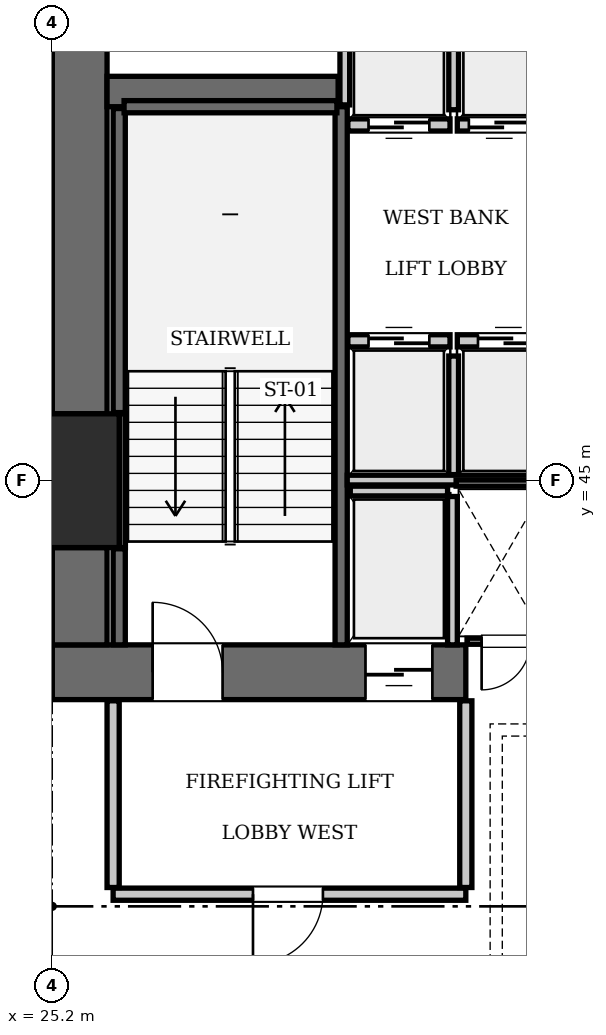
"""IFC4 building model, lengths in metres.
Left out: names, types, materials, properties, quantities, classifications, styles, units other than length and angle.
Written with IfcOpenShell. Run it as: python <this file> out.ifc"""

import sys

from ifc_helpers import new_model, si_unit, direction, frame, frame_2d, origin, origin_2d, place, context, subcontext, project, spatial, rectangle, extrude, element, fill, save


model = new_model("IFC4")
c1 = context("Model", 3, precision=1e-05, world=origin(), true_north=direction((0.0, 1.0)))
c2 = subcontext(c1, "Body", "Model", "MODEL_VIEW")
j1 = project(units=[si_unit("LENGTHUNIT", "METRE"), si_unit("PLANEANGLEUNIT", "RADIAN")], contexts=[c1])
p1 = place(None, origin())
s1 = spatial("IfcSite", under=j1, at=p1, CompositionType="ELEMENT")
p2 = place(p1, origin())
s2 = spatial("IfcBuilding", under=s1, at=p2, CompositionType="ELEMENT")
p3 = place(p2, frame((0.0, 0.0, 26.95)))
s3 = spatial("IfcBuildingStorey", under=s2, at=p3, CompositionType="ELEMENT", Elevation=26.95)
p4 = place(p3, frame((25.2, 45.0, 0.0), z_axis=(0.0, 0.0, 1.0), x_axis=(1.0, 0.0, 0.0)))
e1 = element("IfcColumn", 1, at=p4, inside=s3, PredefinedType="COLUMN", context=c2, shape_type="SweptSolid", body=[
    extrude(rectangle(XDim=2.2, YDim=2.2, at=origin_2d()), origin(), (0.0, 0.0, 1.0), 3.85),
])
p5 = place(p3, frame((25.2, 41.85, 0.0), z_axis=(0.0, 0.0, 1.0), x_axis=(1.0, 0.0, 0.0)))
e2 = element("IfcWall", 2, at=p5, inside=s3, PredefinedType="SHEAR", context=c2, shape_type="SweptSolid", body=[
    extrude(rectangle(XDim=6.8, YDim=0.9, at=frame_2d((3.4, 0.0))), origin(), (0.0, 0.0, 1.0), 3.85),
])
p6 = place(p5, frame((1.65, 0.0, 0.0)))
e3 = element("IfcOpeningElement", 3, at=p6, cuts=e2, PredefinedType="OPENING", context=c2, shape_type="SweptSolid", body=[
    extrude(rectangle(XDim=1.15, YDim=2.15, at=frame_2d((0.575, 1.075))), frame((0.0, 0.46, 0.0), z_axis=(0.0, -1.0, 0.0), x_axis=(1.0, 0.0, 0.0)), (0.0, 0.0, 1.0), 0.92),
])
p7 = place(p5, frame((5.15, 0.0, 0.0)))
e4 = element("IfcOpeningElement", 4, at=p7, cuts=e2, PredefinedType="OPENING", context=c2, shape_type="SweptSolid", body=[
    extrude(rectangle(XDim=1.1, YDim=2.2, at=frame_2d((0.55, 1.1))), frame((0.0, 0.46, 0.0), z_axis=(0.0, -1.0, 0.0), x_axis=(1.0, 0.0, 0.0)), (0.0, 0.0, 1.0), 0.92),
])
p8 = place(p3, frame((25.65, 42.3, 0.0), z_axis=(0.0, 0.0, 1.0), x_axis=(0.0, 1.0, 0.0)))
e5 = element("IfcWall", 5, at=p8, inside=s3, PredefinedType="SHEAR", context=c2, shape_type="SweptSolid", body=[
    extrude(rectangle(XDim=1.6, YDim=0.9, at=frame_2d((0.8, 0.0))), origin(), (0.0, 0.0, 1.0), 3.85),
])
p9 = place(p3, frame((25.65, 46.1, 0.0), z_axis=(0.0, 0.0, 1.0), x_axis=(0.0, 1.0, 0.0)))
e6 = element("IfcWall", 6, at=p9, inside=s3, PredefinedType="SHEAR", context=c2, shape_type="SweptSolid", body=[
    extrude(rectangle(XDim=7.0, YDim=0.9, at=frame_2d((3.5, 0.0))), origin(), (0.0, 0.0, 1.0), 3.85),
])
p10 = place(p3, frame((26.1, 51.4, 0.0), z_axis=(0.0, 0.0, 1.0), x_axis=(1.0, 0.0, 0.0)))
e7 = element("IfcWall", 7, at=p10, inside=s3, PredefinedType="SHEAR", context=c2, shape_type="SweptSolid", body=[
    extrude(rectangle(XDim=3.8, YDim=0.5, at=frame_2d((1.9, 0.0))), origin(), (0.0, 0.0, 1.0), 3.85),
])
p11 = place(p3, frame((29.95, 42.3, 0.0), z_axis=(0.0, 0.0, 1.0), x_axis=(0.0, 1.0, 0.0)))
e8 = element("IfcWall", 8, at=p11, inside=s3, PredefinedType="SOLIDWALL", context=c2, shape_type="SweptSolid", body=[
    extrude(rectangle(XDim=8.85, YDim=0.2, at=frame_2d((4.425, 0.0))), origin(), (0.0, 0.0, 1.0), 3.61),
])
p12 = place(p3, frame((26.3, 42.3, 0.0), z_axis=(0.0, 0.0, 1.0), x_axis=(0.0, 1.0, 0.0)))
e9 = element("IfcWall", 9, at=p12, inside=s3, PredefinedType="SOLIDWALL", context=c2, shape_type="SweptSolid", body=[
    extrude(rectangle(XDim=1.58, YDim=0.2, at=frame_2d((0.79, 0.0))), origin(), (0.0, 0.0, 1.0), 3.61),
])
p13 = place(p3, frame((26.3, 46.12, 0.0), z_axis=(0.0, 0.0, 1.0), x_axis=(0.0, 1.0, 0.0)))
e10 = element("IfcWall", 10, at=p13, inside=s3, PredefinedType="SOLIDWALL", context=c2, shape_type="SweptSolid", body=[
    extrude(rectangle(XDim=5.0, YDim=0.2, at=frame_2d((2.5, 0.0))), origin(), (0.0, 0.0, 1.0), 3.61),
])
p14 = place(p3, frame((26.38, 51.15, 0.0), z_axis=(0.0, 0.0, 1.0), x_axis=(1.0, 0.0, 0.0)))
e11 = element("IfcWall", 11, at=p14, inside=s3, PredefinedType="SOLIDWALL", context=c2, shape_type="SweptSolid", body=[
    extrude(rectangle(XDim=3.5, YDim=0.2, at=frame_2d((1.75, 0.0))), origin(), (0.0, 0.0, 1.0), 3.61),
])
p15 = place(p3, frame((26.352, 43.9, 0.0), z_axis=(0.0, 0.0, 1.0), x_axis=(0.0, 1.0, 0.0)))
e12 = element("IfcWall", 12, at=p15, inside=s3, PredefinedType="SOLIDWALL", context=c2, shape_type="SweptSolid", body=[
    extrude(rectangle(XDim=2.2, YDim=0.1, at=frame_2d((1.1, 0.0))), origin(), (0.0, 0.0, 1.0), 3.61),
])
p16 = place(p3, frame((30.06, 47.3, 0.0), z_axis=(0.0, 0.0, 1.0), x_axis=(1.0, 0.0, 0.0)))
e13 = element("IfcWall", 13, at=p16, inside=s3, PredefinedType="SOLIDWALL", context=c2, shape_type="SweptSolid", body=[
    extrude(rectangle(XDim=1.68, YDim=0.2, at=frame_2d((0.84, 0.0))), origin(), (0.0, 0.0, 1.0), 3.61),
])
p17 = place(p16, frame((0.34, 0.0, 0.0)))
e14 = element("IfcOpeningElement", 14, at=p17, cuts=e13, PredefinedType="OPENING", context=c2, shape_type="SweptSolid", body=[
    extrude(rectangle(XDim=1.0, YDim=2.15, at=frame_2d((0.5, 1.075))), frame((0.0, 0.11, 0.0), z_axis=(0.0, -1.0, 0.0), x_axis=(1.0, 0.0, 0.0)), (0.0, 0.0, 1.0), 0.22),
])
p18 = place(p3, frame((31.86, 47.3, 0.0), z_axis=(0.0, 0.0, 1.0), x_axis=(1.0, 0.0, 0.0)))
e15 = element("IfcWall", 15, at=p18, inside=s3, PredefinedType="SOLIDWALL", context=c2, shape_type="SweptSolid", body=[
    extrude(rectangle(XDim=1.68, YDim=0.2, at=frame_2d((0.84, 0.0))), origin(), (0.0, 0.0, 1.0), 3.61),
])
p19 = place(p18, frame((0.34, 0.0, 0.0)))
e16 = element("IfcOpeningElement", 16, at=p19, cuts=e15, PredefinedType="OPENING", context=c2, shape_type="SweptSolid", body=[
    extrude(rectangle(XDim=1.0, YDim=2.15, at=frame_2d((0.5, 1.075))), frame((0.0, 0.11, 0.0), z_axis=(0.0, -1.0, 0.0), x_axis=(1.0, 0.0, 0.0)), (0.0, 0.0, 1.0), 0.22),
])
p20 = place(p3, frame((30.06, 50.85, 0.0), z_axis=(0.0, 0.0, 1.0), x_axis=(1.0, 0.0, 0.0)))
e17 = element("IfcWall", 17, at=p20, inside=s3, PredefinedType="SOLIDWALL", context=c2, shape_type="SweptSolid", body=[
    extrude(rectangle(XDim=1.68, YDim=0.2, at=frame_2d((0.84, 0.0))), origin(), (0.0, 0.0, 1.0), 3.61),
])
p21 = place(p20, frame((0.34, 0.0, 0.0)))
e18 = element("IfcOpeningElement", 18, at=p21, cuts=e17, PredefinedType="OPENING", context=c2, shape_type="SweptSolid", body=[
    extrude(rectangle(XDim=1.0, YDim=2.15, at=frame_2d((0.5, 1.075))), frame((0.0, 0.11, 0.0), z_axis=(0.0, -1.0, 0.0), x_axis=(1.0, 0.0, 0.0)), (0.0, 0.0, 1.0), 0.22),
])
p22 = place(p3, frame((31.86, 50.85, 0.0), z_axis=(0.0, 0.0, 1.0), x_axis=(1.0, 0.0, 0.0)))
e19 = element("IfcWall", 19, at=p22, inside=s3, PredefinedType="SOLIDWALL", context=c2, shape_type="SweptSolid", body=[
    extrude(rectangle(XDim=1.38, YDim=0.2, at=frame_2d((0.69, 0.0))), origin(), (0.0, 0.0, 1.0), 3.61),
])
p23 = place(p22, frame((0.19, 0.0, 0.0)))
e20 = element("IfcOpeningElement", 20, at=p23, cuts=e19, PredefinedType="OPENING", context=c2, shape_type="SweptSolid", body=[
    extrude(rectangle(XDim=1.0, YDim=2.15, at=frame_2d((0.5, 1.075))), frame((0.0, 0.11, 0.0), z_axis=(0.0, -1.0, 0.0), x_axis=(1.0, 0.0, 0.0)), (0.0, 0.0, 1.0), 0.22),
])
p24 = place(p3, frame((30.1, 44.83, 0.0), z_axis=(0.0, 0.0, 1.0), x_axis=(1.0, 0.0, 0.0)))
e21 = element("IfcWall", 21, at=p24, inside=s3, PredefinedType="SOLIDWALL", context=c2, shape_type="SweptSolid", body=[
    extrude(rectangle(XDim=1.6, YDim=0.16, at=frame_2d((0.8, 0.0))), origin(), (0.0, 0.0, 1.0), 3.61),
])
p25 = place(p3, frame((31.78, 42.3, 0.0), z_axis=(0.0, 0.0, 1.0), x_axis=(0.0, 1.0, 0.0)))
e22 = element("IfcWall", 22, at=p25, inside=s3, PredefinedType="SOLIDWALL", context=c2, shape_type="SweptSolid", body=[
    extrude(rectangle(XDim=2.44, YDim=0.16, at=frame_2d((1.22, 0.0))), origin(), (0.0, 0.0, 1.0), 3.61),
])
p26 = place(p3, frame((31.8, 45.1, 0.0), z_axis=(0.0, 0.0, 1.0), x_axis=(0.0, 1.0, 0.0)))
e23 = element("IfcWall", 23, at=p26, inside=s3, PredefinedType="SOLIDWALL", context=c2, shape_type="SweptSolid", body=[
    extrude(rectangle(XDim=1.95, YDim=0.16, at=frame_2d((0.975, 0.0))), origin(), (0.0, 0.0, 1.0), 3.61),
])
p27 = place(p3, frame((30.05, 45.01, 0.0), z_axis=(0.0, 0.0, 1.0), x_axis=(1.0, 0.0, 0.0)))
e24 = element("IfcWall", 24, at=p27, inside=s3, PredefinedType="SOLIDWALL", context=c2, shape_type="SweptSolid", body=[
    extrude(rectangle(XDim=3.45, YDim=0.16, at=frame_2d((1.725, 0.0))), origin(), (0.0, 0.0, 1.0), 3.61),
])
p28 = place(p3, frame((30.01, 51.18, 0.0), z_axis=(0.0, 0.0, 1.0), x_axis=(0.0, 1.0, 0.0)))
e25 = element("IfcWall", 25, at=p28, inside=s3, PredefinedType="SOLIDWALL", context=c2, shape_type="SweptSolid", body=[
    extrude(rectangle(XDim=1.92, YDim=0.16, at=frame_2d((0.96, 0.0))), origin(), (0.0, 0.0, 1.0), 3.61),
])
p29 = place(p3, frame((31.8, 51.1, 0.0), z_axis=(0.0, 0.0, 1.0), x_axis=(0.0, 1.0, 0.0)))
e26 = element("IfcWall", 26, at=p29, inside=s3, PredefinedType="SOLIDWALL", context=c2, shape_type="SweptSolid", body=[
    extrude(rectangle(XDim=2.0, YDim=0.16, at=frame_2d((1.0, 0.0))), origin(), (0.0, 0.0, 1.0), 3.61),
])
p30 = place(p3, frame((26.2, 38.2, 0.0), z_axis=(0.0, 0.0, 1.0), x_axis=(1.0, 0.0, 0.0)))
e27 = element("IfcWall", 27, at=p30, inside=s3, PredefinedType="PARTITIONING", context=c2, shape_type="SweptSolid", body=[
    extrude(rectangle(XDim=5.8, YDim=0.2, at=frame_2d((2.9, 0.0))), origin(), (0.0, 0.0, 1.0), 3.61),
])
p31 = place(p30, frame((2.3, 0.0, 0.0)))
e28 = element("IfcOpeningElement", 28, at=p31, cuts=e27, PredefinedType="OPENING", context=c2, shape_type="SweptSolid", body=[
    extrude(rectangle(XDim=1.15, YDim=2.15, at=frame_2d((0.575, 1.075))), frame((0.0, 0.11, 0.0), z_axis=(0.0, -1.0, 0.0), x_axis=(1.0, 0.0, 0.0)), (0.0, 0.0, 1.0), 0.22),
])
for number, where, z_axis, x_axis in (
    (29, (26.2, 38.31, 0.0), (0.0, 0.0, 1.0), (0.0, 1.0, 0.0)),
    (30, (32.0, 38.31, 0.0), (0.0, 0.0, 1.0), (0.0, 1.0, 0.0)),
):
    element("IfcWall", number, at=place(p3, frame(where, z_axis=z_axis, x_axis=x_axis)), inside=s3, PredefinedType="PARTITIONING", context=c2, shape_type="SweptSolid", body=[
        extrude(rectangle(XDim=3.07, YDim=0.2, at=frame_2d((1.535, 0.0))), origin(), (0.0, 0.0, 1.0), 3.61),
    ])
p32 = place(p3, frame((32.02, 42.36, 0.0), z_axis=(0.0, 0.0, 1.0), x_axis=(1.0, 0.0, 0.0)))
e31 = element("IfcWall", 31, at=p32, inside=s3, PredefinedType="PARTITIONING", context=c2, shape_type="SweptSolid", body=[
    extrude(rectangle(XDim=1.32, YDim=0.1, at=frame_2d((0.66, 0.0))), origin(), (0.0, 0.0, 1.0), 3.61),
])
p33 = place(p32, frame((0.24, 0.0, 0.0)))
e32 = element("IfcOpeningElement", 32, at=p33, cuts=e31, PredefinedType="OPENING", context=c2, shape_type="SweptSolid", body=[
    extrude(rectangle(XDim=0.8, YDim=2.05, at=frame_2d((0.4, 1.025))), frame((0.0, 0.06, 0.0), z_axis=(0.0, -1.0, 0.0), x_axis=(1.0, 0.0, 0.0)), (0.0, 0.0, 1.0), 0.12),
])
p34 = place(p3, frame((31.84, 44.96, 0.0), z_axis=(0.0, 0.0, 1.0), x_axis=(1.0, 0.0, 0.0)))
e33 = element("IfcWall", 33, at=p34, inside=s3, PredefinedType="PARTITIONING", context=c2, shape_type="SweptSolid", body=[
    extrude(rectangle(XDim=1.48, YDim=0.1, at=frame_2d((0.74, 0.0))), origin(), (0.0, 0.0, 1.0), 3.61),
])
p35 = place(p6, origin())
e34 = element("IfcDoor", 34, at=p35, inside=s3, OperationType="SINGLE_SWING_LEFT", PredefinedType="DOOR", context=c2, shape_type="SweptSolid", body=[
    extrude(rectangle(XDim=1.15, YDim=2.15, at=frame_2d((0.575, 1.075))), frame((0.0, 0.025, 0.0), z_axis=(0.0, -1.0, 0.0), x_axis=(1.0, 0.0, 0.0)), (0.0, 0.0, 1.0), 0.05),
])
fill(e3, e34)
p36 = place(p17, origin())
e35 = element("IfcDoor", 35, at=p36, inside=s3, OperationType="SLIDING_TO_LEFT", PredefinedType="DOOR", context=c2, shape_type="SweptSolid", body=[
    extrude(rectangle(XDim=1.0, YDim=2.15, at=frame_2d((0.5, 1.075))), frame((0.0, 0.025, 0.0), z_axis=(0.0, -1.0, 0.0), x_axis=(1.0, 0.0, 0.0)), (0.0, 0.0, 1.0), 0.05),
])
fill(e14, e35)
p37 = place(p19, origin())
e36 = element("IfcDoor", 36, at=p37, inside=s3, OperationType="SLIDING_TO_LEFT", PredefinedType="DOOR", context=c2, shape_type="SweptSolid", body=[
    extrude(rectangle(XDim=1.0, YDim=2.15, at=frame_2d((0.5, 1.075))), frame((0.0, 0.025, 0.0), z_axis=(0.0, -1.0, 0.0), x_axis=(1.0, 0.0, 0.0)), (0.0, 0.0, 1.0), 0.05),
])
fill(e16, e36)
p38 = place(p21, frame((1.0, 0.0, 0.0), z_axis=(0.0, 0.0, 1.0), x_axis=(-1.0, 0.0, 0.0)))
e37 = element("IfcDoor", 37, at=p38, inside=s3, OperationType="SLIDING_TO_LEFT", PredefinedType="DOOR", context=c2, shape_type="SweptSolid", body=[
    extrude(rectangle(XDim=1.0, YDim=2.15, at=frame_2d((0.5, 1.075))), frame((0.0, 0.025, 0.0), z_axis=(0.0, -1.0, 0.0), x_axis=(1.0, 0.0, 0.0)), (0.0, 0.0, 1.0), 0.05),
])
fill(e18, e37)
p39 = place(p23, frame((1.0, 0.0, 0.0), z_axis=(0.0, 0.0, 1.0), x_axis=(-1.0, 0.0, 0.0)))
e38 = element("IfcDoor", 38, at=p39, inside=s3, OperationType="SLIDING_TO_LEFT", PredefinedType="DOOR", context=c2, shape_type="SweptSolid", body=[
    extrude(rectangle(XDim=1.0, YDim=2.15, at=frame_2d((0.5, 1.075))), frame((0.0, 0.025, 0.0), z_axis=(0.0, -1.0, 0.0), x_axis=(1.0, 0.0, 0.0)), (0.0, 0.0, 1.0), 0.05),
])
fill(e20, e38)
p40 = place(p7, frame((1.1, 0.0, 0.0), z_axis=(0.0, 0.0, 1.0), x_axis=(-1.0, 0.0, 0.0)))
e39 = element("IfcDoor", 39, at=p40, inside=s3, OperationType="SLIDING_TO_LEFT", PredefinedType="DOOR", context=c2, shape_type="SweptSolid", body=[
    extrude(rectangle(XDim=1.1, YDim=2.2, at=frame_2d((0.55, 1.1))), frame((0.0, 0.025, 0.0), z_axis=(0.0, -1.0, 0.0), x_axis=(1.0, 0.0, 0.0)), (0.0, 0.0, 1.0), 0.05),
])
fill(e4, e39)
p41 = place(p31, frame((1.15, 0.0, 0.0), z_axis=(0.0, 0.0, 1.0), x_axis=(-1.0, 0.0, 0.0)))
e40 = element("IfcDoor", 40, at=p41, inside=s3, OperationType="SINGLE_SWING_RIGHT", PredefinedType="DOOR", context=c2, shape_type="SweptSolid", body=[
    extrude(rectangle(XDim=1.15, YDim=2.15, at=frame_2d((0.575, 1.075))), frame((0.0, 0.025, 0.0), z_axis=(0.0, -1.0, 0.0), x_axis=(1.0, 0.0, 0.0)), (0.0, 0.0, 1.0), 0.05),
])
fill(e28, e40)
p42 = place(p33, frame((0.8, 0.0, 0.0), z_axis=(0.0, 0.0, 1.0), x_axis=(-1.0, 0.0, 0.0)))
e41 = element("IfcDoor", 41, at=p42, inside=s3, OperationType="SINGLE_SWING_RIGHT", PredefinedType="DOOR", context=c2, shape_type="SweptSolid", body=[
    extrude(rectangle(XDim=0.8, YDim=2.05, at=frame_2d((0.4, 1.025))), frame((0.0, 0.025, 0.0), z_axis=(0.0, -1.0, 0.0), x_axis=(1.0, 0.0, 0.0)), (0.0, 0.0, 1.0), 0.05),
])
fill(e32, e41)
save(model, sys.argv[1])
